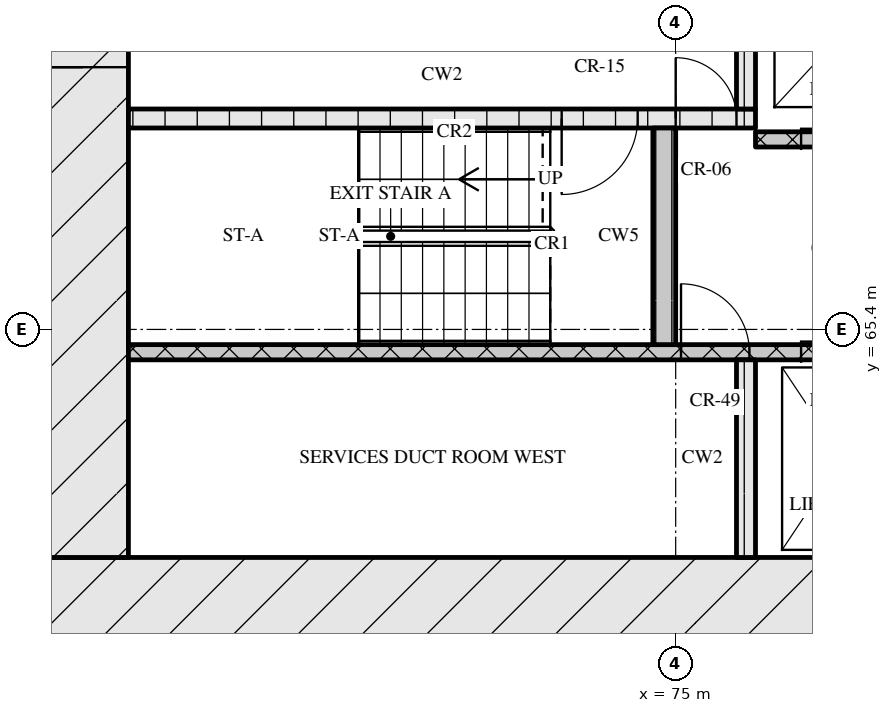
"""IFC4 building model, lengths in metres.
Left out: names, types, materials, properties, quantities, classifications, styles, units other than length and angle.
Written with IfcOpenShell. Run it as: python <this file> out.ifc"""

import sys

from ifc_helpers import new_model, si_unit, direction, frame, frame_2d, origin, place, context, subcontext, project, spatial, rectangle, extrude, element, fill, save


model = new_model("IFC4")
c1 = context("Model", 3, precision=1e-05, world=origin(), true_north=direction((0.0, 1.0)))
c2 = subcontext(c1, "Body", "Model", "MODEL_VIEW")
j1 = project(units=[si_unit("LENGTHUNIT", "METRE"), si_unit("PLANEANGLEUNIT", "RADIAN")], contexts=[c1])
p1 = place(None, origin())
s1 = spatial("IfcSite", under=j1, at=p1, CompositionType="ELEMENT")
p2 = place(p1, origin())
s2 = spatial("IfcBuilding", under=s1, at=p2, CompositionType="ELEMENT")
p3 = place(p2, frame((0.0, 0.0, 58.8)))
s3 = spatial("IfcBuildingStorey", under=s2, at=p3, CompositionType="ELEMENT", Elevation=58.8)
p4 = place(p3, frame((66.6, 61.8, 0.0), z_axis=(0.0, 0.0, 1.0), x_axis=(1.0, 0.0, 0.0)))
e1 = element("IfcWall", 1, at=p4, inside=s3, PredefinedType="SOLIDWALL", context=c2, shape_type="SweptSolid", body=[
    extrude(rectangle(XDim=42.0, YDim=1.2, at=frame_2d((21.0, 0.0))), origin(), (0.0, 0.0, 1.0), 3.32),
])
p5 = place(p4, frame((21.35, 0.0, 0.0)))
e2 = element("IfcOpeningElement", 2, at=p5, cuts=e1, PredefinedType="OPENING", context=c2, shape_type="SweptSolid", body=[
    extrude(rectangle(XDim=1.8, YDim=2.1, at=frame_2d((0.9, 1.05))), frame((0.0, 0.61, 0.0), z_axis=(0.0, -1.0, 0.0), x_axis=(1.0, 0.0, 0.0)), (0.0, 0.0, 1.0), 1.22),
])
p6 = place(p3, frame((67.2, 62.4, 0.0), z_axis=(0.0, 0.0, 1.0), x_axis=(0.0, 1.0, 0.0)))
e3 = element("IfcWall", 3, at=p6, inside=s3, PredefinedType="SOLIDWALL", context=c2, shape_type="SweptSolid", body=[
    extrude(rectangle(XDim=12.0, YDim=1.2, at=frame_2d((6.0, 0.0))), origin(), (0.0, 0.0, 1.0), 3.32),
])
p7 = place(p6, frame((6.45, 0.0, 0.0)))
e4 = element("IfcOpeningElement", 4, at=p7, cuts=e3, PredefinedType="OPENING", context=c2, shape_type="SweptSolid", body=[
    extrude(rectangle(XDim=1.2, YDim=2.1, at=frame_2d((0.6, 1.05))), frame((0.0, 0.61, 0.0), z_axis=(0.0, -1.0, 0.0), x_axis=(1.0, 0.0, 0.0)), (0.0, 0.0, 1.0), 1.22),
])
p8 = place(p3, frame((75.925, 62.4, 0.0), z_axis=(0.0, 0.0, 1.0), x_axis=(0.0, 1.0, 0.0)))
e5 = element("IfcWall", 5, at=p8, inside=s3, PredefinedType="SOLIDWALL", context=c2, shape_type="SweptSolid", body=[
    extrude(rectangle(XDim=2.6, YDim=0.25, at=frame_2d((1.3, 0.0))), origin(), (0.0, 0.0, 1.0), 3.32),
])
p9 = place(p3, frame((67.8, 65.1, 0.0), z_axis=(0.0, 0.0, 1.0), x_axis=(1.0, 0.0, 0.0)))
e6 = element("IfcWall", 6, at=p9, inside=s3, PredefinedType="SOLIDWALL", context=c2, shape_type="SweptSolid", body=[
    extrude(rectangle(XDim=18.5, YDim=0.2, at=frame_2d((9.25, 0.0))), origin(), (0.0, 0.0, 1.0), 3.32),
])
p10 = place(p9, frame((7.27, 0.0, 0.0)))
e7 = element("IfcOpeningElement", 7, at=p10, cuts=e6, PredefinedType="OPENING", context=c2, shape_type="SweptSolid", body=[
    extrude(rectangle(XDim=0.9, YDim=2.1, at=frame_2d((0.45, 1.05))), frame((0.0, 0.11, 0.0), z_axis=(0.0, -1.0, 0.0), x_axis=(1.0, 0.0, 0.0)), (0.0, 0.0, 1.0), 0.22),
])
p11 = place(p9, frame((8.85, 0.0, 0.0)))
e8 = element("IfcOpeningElement", 8, at=p11, cuts=e6, PredefinedType="OPENING", context=c2, shape_type="SweptSolid", body=[
    extrude(rectangle(XDim=1.1, YDim=2.1, at=frame_2d((0.55, 1.05))), frame((0.0, 0.11, 0.0), z_axis=(0.0, -1.0, 0.0), x_axis=(1.0, 0.0, 0.0)), (0.0, 0.0, 1.0), 0.22),
])
p12 = place(p9, frame((11.35, 0.0, 0.0)))
e9 = element("IfcOpeningElement", 9, at=p12, cuts=e6, PredefinedType="OPENING", context=c2, shape_type="SweptSolid", body=[
    extrude(rectangle(XDim=1.1, YDim=2.1, at=frame_2d((0.55, 1.05))), frame((0.0, 0.11, 0.0), z_axis=(0.0, -1.0, 0.0), x_axis=(1.0, 0.0, 0.0)), (0.0, 0.0, 1.0), 0.22),
])
p13 = place(p9, frame((13.85, 0.0, 0.0)))
e10 = element("IfcOpeningElement", 10, at=p13, cuts=e6, PredefinedType="OPENING", context=c2, shape_type="SweptSolid", body=[
    extrude(rectangle(XDim=1.1, YDim=2.1, at=frame_2d((0.55, 1.05))), frame((0.0, 0.11, 0.0), z_axis=(0.0, -1.0, 0.0), x_axis=(1.0, 0.0, 0.0)), (0.0, 0.0, 1.0), 0.22),
])
p14 = place(p9, frame((16.7, 0.0, 0.0)))
e11 = element("IfcOpeningElement", 11, at=p14, cuts=e6, PredefinedType="OPENING", context=c2, shape_type="SweptSolid", body=[
    extrude(rectangle(XDim=0.9, YDim=2.1, at=frame_2d((0.45, 1.05))), frame((0.0, 0.11, 0.0), z_axis=(0.0, -1.0, 0.0), x_axis=(1.0, 0.0, 0.0)), (0.0, 0.0, 1.0), 0.22),
])
p15 = place(p3, frame((74.85, 65.2, 0.0), z_axis=(0.0, 0.0, 1.0), x_axis=(0.0, 1.0, 0.0)))
e12 = element("IfcWall", 12, at=p15, inside=s3, PredefinedType="SOLIDWALL", context=c2, shape_type="SweptSolid", body=[
    extrude(rectangle(XDim=2.85, YDim=0.3, at=frame_2d((1.425, 0.0))), origin(), (0.0, 0.0, 1.0), 3.32),
])
p16 = place(p3, frame((76.05, 67.9, 0.0), z_axis=(0.0, 0.0, 1.0), x_axis=(1.0, 0.0, 0.0)))
e13 = element("IfcWall", 13, at=p16, inside=s3, PredefinedType="SOLIDWALL", context=c2, shape_type="SweptSolid", body=[
    extrude(rectangle(XDim=23.1, YDim=0.2, at=frame_2d((11.55, 0.0))), origin(), (0.0, 0.0, 1.0), 3.32),
])
p17 = place(p16, frame((0.6, 0.0, 0.0)))
e14 = element("IfcOpeningElement", 14, at=p17, cuts=e13, PredefinedType="OPENING", context=c2, shape_type="SweptSolid", body=[
    extrude(rectangle(XDim=1.1, YDim=2.1, at=frame_2d((0.55, 1.05))), frame((0.0, 0.11, 0.0), z_axis=(0.0, -1.0, 0.0), x_axis=(1.0, 0.0, 0.0)), (0.0, 0.0, 1.0), 0.22),
])
p18 = place(p16, frame((3.1, 0.0, 0.0)))
e15 = element("IfcOpeningElement", 15, at=p18, cuts=e13, PredefinedType="OPENING", context=c2, shape_type="SweptSolid", body=[
    extrude(rectangle(XDim=1.1, YDim=2.1, at=frame_2d((0.55, 1.05))), frame((0.0, 0.11, 0.0), z_axis=(0.0, -1.0, 0.0), x_axis=(1.0, 0.0, 0.0)), (0.0, 0.0, 1.0), 0.22),
])
p19 = place(p16, frame((5.6, 0.0, 0.0)))
e16 = element("IfcOpeningElement", 16, at=p19, cuts=e13, PredefinedType="OPENING", context=c2, shape_type="SweptSolid", body=[
    extrude(rectangle(XDim=1.1, YDim=2.1, at=frame_2d((0.55, 1.05))), frame((0.0, 0.11, 0.0), z_axis=(0.0, -1.0, 0.0), x_axis=(1.0, 0.0, 0.0)), (0.0, 0.0, 1.0), 0.22),
])
p20 = place(p16, frame((8.45, 0.0, 0.0)))
e17 = element("IfcOpeningElement", 17, at=p20, cuts=e13, PredefinedType="OPENING", context=c2, shape_type="SweptSolid", body=[
    extrude(rectangle(XDim=0.9, YDim=2.1, at=frame_2d((0.45, 1.05))), frame((0.0, 0.11, 0.0), z_axis=(0.0, -1.0, 0.0), x_axis=(1.0, 0.0, 0.0)), (0.0, 0.0, 1.0), 0.22),
])
p21 = place(p16, frame((10.91, 0.0, 0.0)))
e18 = element("IfcOpeningElement", 18, at=p21, cuts=e13, PredefinedType="OPENING", context=c2, shape_type="SweptSolid", body=[
    extrude(rectangle(XDim=0.9, YDim=2.1, at=frame_2d((0.45, 1.05))), frame((0.0, 0.11, 0.0), z_axis=(0.0, -1.0, 0.0), x_axis=(1.0, 0.0, 0.0)), (0.0, 0.0, 1.0), 0.22),
])
p22 = place(p16, frame((13.55, 0.0, 0.0)))
e19 = element("IfcOpeningElement", 19, at=p22, cuts=e13, PredefinedType="OPENING", context=c2, shape_type="SweptSolid", body=[
    extrude(rectangle(XDim=1.0, YDim=2.1, at=frame_2d((0.5, 1.05))), frame((0.0, 0.11, 0.0), z_axis=(0.0, -1.0, 0.0), x_axis=(1.0, 0.0, 0.0)), (0.0, 0.0, 1.0), 0.22),
])
p23 = place(p3, frame((67.8, 68.175, 0.0), z_axis=(0.0, 0.0, 1.0), x_axis=(1.0, 0.0, 0.0)))
e20 = element("IfcWall", 20, at=p23, inside=s3, PredefinedType="SOLIDWALL", context=c2, shape_type="SweptSolid", body=[
    extrude(rectangle(XDim=8.25, YDim=0.25, at=frame_2d((4.125, 0.0))), origin(), (0.0, 0.0, 1.0), 3.32),
])
p24 = place(p23, frame((5.7, 0.0, 0.0)))
e21 = element("IfcOpeningElement", 21, at=p24, cuts=e20, PredefinedType="OPENING", context=c2, shape_type="SweptSolid", body=[
    extrude(rectangle(XDim=1.0, YDim=2.1, at=frame_2d((0.5, 1.05))), frame((0.0, 0.135, 0.0), z_axis=(0.0, -1.0, 0.0), x_axis=(1.0, 0.0, 0.0)), (0.0, 0.0, 1.0), 0.27),
])
p25 = place(p23, frame((7.2, 0.0, 0.0)))
e22 = element("IfcOpeningElement", 22, at=p25, cuts=e20, PredefinedType="OPENING", context=c2, shape_type="SweptSolid", body=[
    extrude(rectangle(XDim=0.8, YDim=2.1, at=frame_2d((0.4, 1.05))), frame((0.0, 0.135, 0.0), z_axis=(0.0, -1.0, 0.0), x_axis=(1.0, 0.0, 0.0)), (0.0, 0.0, 1.0), 0.27),
])
p26 = place(p3, frame((75.925, 68.3, 0.0), z_axis=(0.0, 0.0, 1.0), x_axis=(0.0, 1.0, 0.0)))
e23 = element("IfcWall", 23, at=p26, inside=s3, PredefinedType="SOLIDWALL", context=c2, shape_type="SweptSolid", body=[
    extrude(rectangle(XDim=2.3, YDim=0.25, at=frame_2d((1.15, 0.0))), origin(), (0.0, 0.0, 1.0), 3.32),
])
p27 = place(p10, origin())
e24 = element("IfcDoor", 24, at=p27, inside=s3, OperationType="SINGLE_SWING_LEFT", PredefinedType="DOOR", context=c2, shape_type="SweptSolid", body=[
    extrude(rectangle(XDim=0.9, YDim=2.1, at=frame_2d((0.45, 1.05))), frame((0.0, 0.025, 0.0), z_axis=(0.0, -1.0, 0.0), x_axis=(1.0, 0.0, 0.0)), (0.0, 0.0, 1.0), 0.05),
])
fill(e7, e24)
p28 = place(p11, origin())
e25 = element("IfcDoor", 25, at=p28, inside=s3, OperationType="SLIDING_TO_LEFT", PredefinedType="DOOR", context=c2, shape_type="SweptSolid", body=[
    extrude(rectangle(XDim=1.1, YDim=2.1, at=frame_2d((0.55, 1.05))), frame((0.0, 0.025, 0.0), z_axis=(0.0, -1.0, 0.0), x_axis=(1.0, 0.0, 0.0)), (0.0, 0.0, 1.0), 0.05),
])
fill(e8, e25)
p29 = place(p17, origin())
e26 = element("IfcDoor", 26, at=p29, inside=s3, OperationType="SLIDING_TO_RIGHT", PredefinedType="DOOR", context=c2, shape_type="SweptSolid", body=[
    extrude(rectangle(XDim=1.1, YDim=2.1, at=frame_2d((0.55, 1.05))), frame((0.0, 0.025, 0.0), z_axis=(0.0, -1.0, 0.0), x_axis=(1.0, 0.0, 0.0)), (0.0, 0.0, 1.0), 0.05),
])
fill(e14, e26)
p30 = place(p24, origin())
e27 = element("IfcDoor", 27, at=p30, inside=s3, OperationType="SINGLE_SWING_RIGHT", PredefinedType="DOOR", context=c2, shape_type="SweptSolid", body=[
    extrude(rectangle(XDim=1.0, YDim=2.1, at=frame_2d((0.5, 1.05))), frame((0.0, 0.025, 0.0), z_axis=(0.0, -1.0, 0.0), x_axis=(1.0, 0.0, 0.0)), (0.0, 0.0, 1.0), 0.05),
])
fill(e21, e27)
p31 = place(p25, origin())
e28 = element("IfcDoor", 28, at=p31, inside=s3, OperationType="SINGLE_SWING_LEFT", PredefinedType="DOOR", context=c2, shape_type="SweptSolid", body=[
    extrude(rectangle(XDim=0.8, YDim=2.1, at=frame_2d((0.4, 1.05))), frame((0.0, 0.025, 0.0), z_axis=(0.0, -1.0, 0.0), x_axis=(1.0, 0.0, 0.0)), (0.0, 0.0, 1.0), 0.05),
])
fill(e22, e28)
p32 = place(p7, origin())
e29 = element("IfcDoor", 29, at=p32, inside=s3, OperationType="SINGLE_SWING_LEFT", PredefinedType="DOOR", context=c2, shape_type="SweptSolid", body=[
    extrude(rectangle(XDim=1.2, YDim=2.1, at=frame_2d((0.6, 1.05))), frame((0.0, 0.025, 0.0), z_axis=(0.0, -1.0, 0.0), x_axis=(1.0, 0.0, 0.0)), (0.0, 0.0, 1.0), 0.05),
])
fill(e4, e29)
save(model, sys.argv[1])
